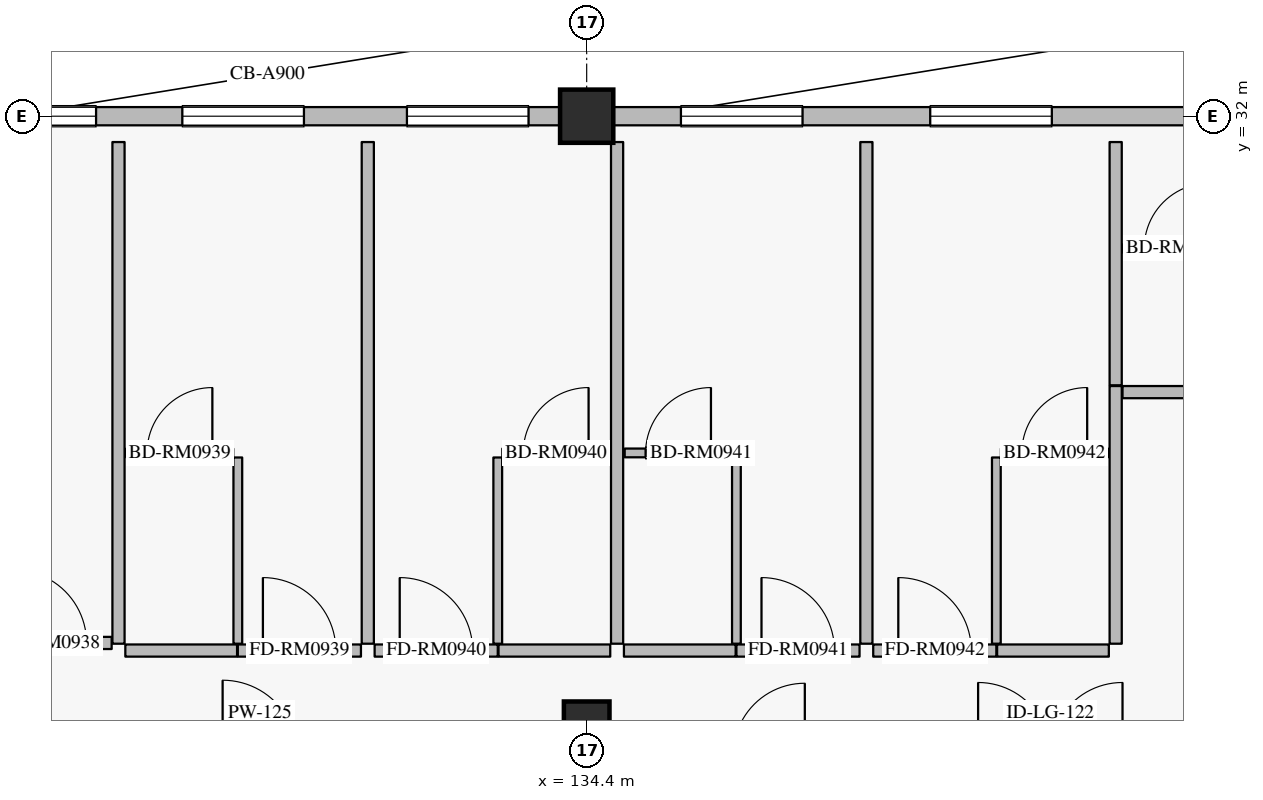
"""IFC4 building model, lengths in metres.
Left out: names, types, materials, properties, quantities, classifications, styles, units other than length and angle.
Written with IfcOpenShell. Run it as: python <this file> out.ifc"""

import sys

from ifc_helpers import new_model, si_unit, direction, frame, frame_2d, origin, origin_2d, place, context, subcontext, project, spatial, rectangle, extrude, element, fill, save


model = new_model("IFC4")
c1 = context("Model", 3, precision=1e-05, world=origin(), true_north=direction((0.0, 1.0)))
c2 = subcontext(c1, "Body", "Model", "MODEL_VIEW")
j1 = project(units=[si_unit("LENGTHUNIT", "METRE"), si_unit("PLANEANGLEUNIT", "RADIAN")], contexts=[c1])
p1 = place(None, origin())
s1 = spatial("IfcSite", under=j1, at=p1, CompositionType="ELEMENT")
p2 = place(p1, origin())
s2 = spatial("IfcBuilding", under=s1, at=p2, CompositionType="ELEMENT")
p3 = place(p2, frame((0.0, 0.0, 36.0)))
s3 = spatial("IfcBuildingStorey", under=s2, at=p3, CompositionType="ELEMENT", Elevation=36.0)
p4 = place(p3, frame((134.4, 32.0, 0.0), z_axis=(0.0, 0.0, 1.0), x_axis=(1.0, 0.0, 0.0)))
e1 = element("IfcColumn", 1, at=p4, inside=s3, PredefinedType="COLUMN", context=c2, shape_type="SweptSolid", body=[
    extrude(rectangle(XDim=0.7, YDim=0.7, at=origin_2d()), origin(), (0.0, 0.0, 1.0), 3.6),
])
p5 = place(p3, frame((134.4, 24.0, 0.0), z_axis=(0.0, 0.0, 1.0), x_axis=(1.0, 0.0, 0.0)))
e2 = element("IfcColumn", 2, at=p5, inside=s3, PredefinedType="COLUMN", context=c2, shape_type="SweptSolid", body=[
    extrude(rectangle(XDim=0.6, YDim=0.6, at=origin_2d()), origin(), (0.0, 0.0, 1.0), 3.6),
])
p6 = place(p3, frame((126.35, 32.0, 0.0), z_axis=(0.0, 0.0, 1.0), x_axis=(1.0, 0.0, 0.0)))
e3 = element("IfcWall", 3, at=p6, inside=s3, PredefinedType="SOLIDWALL", context=c2, shape_type="SweptSolid", body=[
    extrude(rectangle(XDim=7.7, YDim=0.24, at=frame_2d((3.85, 0.0))), origin(), (0.0, 0.0, 1.0), 2.94),
])
p7 = place(p6, frame((0.195, 0.0, 0.8)))
e4 = element("IfcOpeningElement", 4, at=p7, cuts=e3, PredefinedType="OPENING", context=c2, shape_type="SweptSolid", body=[
    extrude(rectangle(XDim=1.4, YDim=1.6, at=frame_2d((0.7, 0.8))), frame((0.0, 0.13, 0.0), z_axis=(0.0, -1.0, 0.0), x_axis=(1.0, 0.0, 0.0)), (0.0, 0.0, 1.0), 0.26),
])
p8 = place(p6, frame((2.73, 0.0, 0.8)))
e5 = element("IfcOpeningElement", 5, at=p8, cuts=e3, PredefinedType="OPENING", context=c2, shape_type="SweptSolid", body=[
    extrude(rectangle(XDim=1.6, YDim=1.6, at=frame_2d((0.8, 0.8))), frame((0.0, 0.13, 0.0), z_axis=(0.0, -1.0, 0.0), x_axis=(1.0, 0.0, 0.0)), (0.0, 0.0, 1.0), 0.26),
])
p9 = place(p6, frame((5.685, 0.0, 0.8)))
e6 = element("IfcOpeningElement", 6, at=p9, cuts=e3, PredefinedType="OPENING", context=c2, shape_type="SweptSolid", body=[
    extrude(rectangle(XDim=1.6, YDim=1.6, at=frame_2d((0.8, 0.8))), frame((0.0, 0.13, 0.0), z_axis=(0.0, -1.0, 0.0), x_axis=(1.0, 0.0, 0.0)), (0.0, 0.0, 1.0), 0.26),
])
p10 = place(p3, frame((134.75, 32.0, 0.0), z_axis=(0.0, 0.0, 1.0), x_axis=(1.0, 0.0, 0.0)))
e7 = element("IfcWall", 7, at=p10, inside=s3, PredefinedType="SOLIDWALL", context=c2, shape_type="SweptSolid", body=[
    extrude(rectangle(XDim=7.7, YDim=0.24, at=frame_2d((3.85, 0.0))), origin(), (0.0, 0.0, 1.0), 2.94),
])
p11 = place(p10, frame((0.89, 0.0, 0.8)))
e8 = element("IfcOpeningElement", 8, at=p11, cuts=e7, PredefinedType="OPENING", context=c2, shape_type="SweptSolid", body=[
    extrude(rectangle(XDim=1.6, YDim=1.6, at=frame_2d((0.8, 0.8))), frame((0.0, 0.13, 0.0), z_axis=(0.0, -1.0, 0.0), x_axis=(1.0, 0.0, 0.0)), (0.0, 0.0, 1.0), 0.26),
])
p12 = place(p10, frame((4.17, 0.0, 0.8)))
e9 = element("IfcOpeningElement", 9, at=p12, cuts=e7, PredefinedType="OPENING", context=c2, shape_type="SweptSolid", body=[
    extrude(rectangle(XDim=1.6, YDim=1.6, at=frame_2d((0.8, 0.8))), frame((0.0, 0.13, 0.0), z_axis=(0.0, -1.0, 0.0), x_axis=(1.0, 0.0, 0.0)), (0.0, 0.0, 1.0), 0.26),
])
p13 = place(p3, frame((126.53, 25.07, 0.0), z_axis=(0.0, 0.0, 1.0), x_axis=(1.0, 0.0, 0.0)))
e10 = element("IfcWall", 10, at=p13, inside=s3, PredefinedType="PARTITIONING", context=c2, shape_type="SweptSolid", body=[
    extrude(rectangle(XDim=1.62, YDim=0.16, at=frame_2d((0.81, 0.0))), origin(), (0.0, 0.0, 1.0), 3.365),
])
p14 = place(p13, frame((0.33, 0.0, 0.0)))
e11 = element("IfcOpeningElement", 11, at=p14, cuts=e10, PredefinedType="OPENING", context=c2, shape_type="SweptSolid", body=[
    extrude(rectangle(XDim=0.96, YDim=2.2, at=frame_2d((0.48, 1.1))), frame((0.0, 0.09, 0.0), z_axis=(0.0, -1.0, 0.0), x_axis=(1.0, 0.0, 0.0)), (0.0, 0.0, 1.0), 0.18),
])
p15 = place(p3, frame((128.33, 24.97, 0.0), z_axis=(0.0, 0.0, 1.0), x_axis=(1.0, 0.0, 0.0)))
e12 = element("IfcWall", 12, at=p15, inside=s3, PredefinedType="PARTITIONING", context=c2, shape_type="SweptSolid", body=[
    extrude(rectangle(XDim=1.47, YDim=0.16, at=frame_2d((0.735, 0.0))), origin(), (0.0, 0.0, 1.0), 3.365),
])
p16 = place(p3, frame((129.81, 24.97, 0.0), z_axis=(0.0, 0.0, 1.0), x_axis=(1.0, 0.0, 0.0)))
e13 = element("IfcWall", 13, at=p16, inside=s3, PredefinedType="PARTITIONING", context=c2, shape_type="SweptSolid", body=[
    extrude(rectangle(XDim=1.62, YDim=0.16, at=frame_2d((0.81, 0.0))), origin(), (0.0, 0.0, 1.0), 3.365),
])
p17 = place(p16, frame((0.33, 0.0, 0.0)))
e14 = element("IfcOpeningElement", 14, at=p17, cuts=e13, PredefinedType="OPENING", context=c2, shape_type="SweptSolid", body=[
    extrude(rectangle(XDim=0.96, YDim=2.2, at=frame_2d((0.48, 1.1))), frame((0.0, 0.09, 0.0), z_axis=(0.0, -1.0, 0.0), x_axis=(1.0, 0.0, 0.0)), (0.0, 0.0, 1.0), 0.18),
])
p18 = place(p3, frame((129.81, 25.06, 0.0), z_axis=(0.0, 0.0, 1.0), x_axis=(0.0, 1.0, 0.0)))
e15 = element("IfcWall", 15, at=p18, inside=s3, PredefinedType="PARTITIONING", context=c2, shape_type="SweptSolid", body=[
    extrude(rectangle(XDim=2.45, YDim=0.115, at=frame_2d((1.225, 0.0))), origin(), (0.0, 0.0, 1.0), 3.365),
])
p19 = place(p3, frame((128.34, 27.57, 0.0), z_axis=(0.0, 0.0, 1.0), x_axis=(1.0, 0.0, 0.0)))
e16 = element("IfcWall", 16, at=p19, inside=s3, PredefinedType="PARTITIONING", context=c2, shape_type="SweptSolid", body=[
    extrude(rectangle(XDim=1.41, YDim=0.115, at=frame_2d((0.705, 0.0))), origin(), (0.0, 0.0, 1.0), 3.365),
])
p20 = place(p19, frame((0.275, 0.0, 0.0)))
e17 = element("IfcOpeningElement", 17, at=p20, cuts=e16, PredefinedType="OPENING", context=c2, shape_type="SweptSolid", body=[
    extrude(rectangle(XDim=0.86, YDim=2.12, at=frame_2d((0.43, 1.06))), frame((0.0, 0.067, 0.0), z_axis=(0.0, -1.0, 0.0), x_axis=(1.0, 0.0, 0.0)), (0.0, 0.0, 1.0), 0.135),
])
p21 = place(p3, frame((128.24, 25.06, 0.0), z_axis=(0.0, 0.0, 1.0), x_axis=(0.0, 1.0, 0.0)))
e18 = element("IfcWall", 18, at=p21, inside=s3, PredefinedType="PARTITIONING", context=c2, shape_type="SweptSolid", body=[
    extrude(rectangle(XDim=6.6, YDim=0.16, at=frame_2d((3.3, 0.0))), origin(), (0.0, 0.0, 1.0), 3.365),
])
p22 = place(p3, frame((131.61, 24.97, 0.0), z_axis=(0.0, 0.0, 1.0), x_axis=(1.0, 0.0, 0.0)))
e19 = element("IfcWall", 19, at=p22, inside=s3, PredefinedType="PARTITIONING", context=c2, shape_type="SweptSolid", body=[
    extrude(rectangle(XDim=1.62, YDim=0.16, at=frame_2d((0.81, 0.0))), origin(), (0.0, 0.0, 1.0), 3.365),
])
p23 = place(p22, frame((0.33, 0.0, 0.0)))
e20 = element("IfcOpeningElement", 20, at=p23, cuts=e19, PredefinedType="OPENING", context=c2, shape_type="SweptSolid", body=[
    extrude(rectangle(XDim=0.96, YDim=2.2, at=frame_2d((0.48, 1.1))), frame((0.0, 0.09, 0.0), z_axis=(0.0, -1.0, 0.0), x_axis=(1.0, 0.0, 0.0)), (0.0, 0.0, 1.0), 0.18),
])
p24 = place(p3, frame((133.24, 24.97, 0.0), z_axis=(0.0, 0.0, 1.0), x_axis=(1.0, 0.0, 0.0)))
e21 = element("IfcWall", 21, at=p24, inside=s3, PredefinedType="PARTITIONING", context=c2, shape_type="SweptSolid", body=[
    extrude(rectangle(XDim=1.47, YDim=0.16, at=frame_2d((0.735, 0.0))), origin(), (0.0, 0.0, 1.0), 3.365),
])
p25 = place(p3, frame((133.23, 25.06, 0.0), z_axis=(0.0, 0.0, 1.0), x_axis=(0.0, 1.0, 0.0)))
e22 = element("IfcWall", 22, at=p25, inside=s3, PredefinedType="PARTITIONING", context=c2, shape_type="SweptSolid", body=[
    extrude(rectangle(XDim=2.45, YDim=0.115, at=frame_2d((1.225, 0.0))), origin(), (0.0, 0.0, 1.0), 3.365),
])
p26 = place(p3, frame((133.29, 27.57, 0.0), z_axis=(0.0, 0.0, 1.0), x_axis=(1.0, 0.0, 0.0)))
e23 = element("IfcWall", 23, at=p26, inside=s3, PredefinedType="PARTITIONING", context=c2, shape_type="SweptSolid", body=[
    extrude(rectangle(XDim=1.41, YDim=0.115, at=frame_2d((0.705, 0.0))), origin(), (0.0, 0.0, 1.0), 3.365),
])
p27 = place(p26, frame((0.275, 0.0, 0.0)))
e24 = element("IfcOpeningElement", 24, at=p27, cuts=e23, PredefinedType="OPENING", context=c2, shape_type="SweptSolid", body=[
    extrude(rectangle(XDim=0.86, YDim=2.12, at=frame_2d((0.43, 1.06))), frame((0.0, 0.067, 0.0), z_axis=(0.0, -1.0, 0.0), x_axis=(1.0, 0.0, 0.0)), (0.0, 0.0, 1.0), 0.135),
])
p28 = place(p3, frame((131.52, 25.06, 0.0), z_axis=(0.0, 0.0, 1.0), x_axis=(0.0, 1.0, 0.0)))
e25 = element("IfcWall", 25, at=p28, inside=s3, PredefinedType="PARTITIONING", context=c2, shape_type="SweptSolid", body=[
    extrude(rectangle(XDim=6.6, YDim=0.16, at=frame_2d((3.3, 0.0))), origin(), (0.0, 0.0, 1.0), 3.365),
])
p29 = place(p3, frame((134.89, 24.97, 0.0), z_axis=(0.0, 0.0, 1.0), x_axis=(1.0, 0.0, 0.0)))
e26 = element("IfcWall", 26, at=p29, inside=s3, PredefinedType="PARTITIONING", context=c2, shape_type="SweptSolid", body=[
    extrude(rectangle(XDim=1.47, YDim=0.16, at=frame_2d((0.735, 0.0))), origin(), (0.0, 0.0, 1.0), 3.365),
])
p30 = place(p3, frame((136.37, 24.97, 0.0), z_axis=(0.0, 0.0, 1.0), x_axis=(1.0, 0.0, 0.0)))
e27 = element("IfcWall", 27, at=p30, inside=s3, PredefinedType="PARTITIONING", context=c2, shape_type="SweptSolid", body=[
    extrude(rectangle(XDim=1.62, YDim=0.16, at=frame_2d((0.81, 0.0))), origin(), (0.0, 0.0, 1.0), 3.365),
])
p31 = place(p30, frame((0.33, 0.0, 0.0)))
e28 = element("IfcOpeningElement", 28, at=p31, cuts=e27, PredefinedType="OPENING", context=c2, shape_type="SweptSolid", body=[
    extrude(rectangle(XDim=0.96, YDim=2.2, at=frame_2d((0.48, 1.1))), frame((0.0, 0.09, 0.0), z_axis=(0.0, -1.0, 0.0), x_axis=(1.0, 0.0, 0.0)), (0.0, 0.0, 1.0), 0.18),
])
p32 = place(p3, frame((136.37, 25.06, 0.0), z_axis=(0.0, 0.0, 1.0), x_axis=(0.0, 1.0, 0.0)))
e29 = element("IfcWall", 29, at=p32, inside=s3, PredefinedType="PARTITIONING", context=c2, shape_type="SweptSolid", body=[
    extrude(rectangle(XDim=2.45, YDim=0.115, at=frame_2d((1.225, 0.0))), origin(), (0.0, 0.0, 1.0), 3.365),
])
p33 = place(p3, frame((134.9, 27.57, 0.0), z_axis=(0.0, 0.0, 1.0), x_axis=(1.0, 0.0, 0.0)))
e30 = element("IfcWall", 30, at=p33, inside=s3, PredefinedType="PARTITIONING", context=c2, shape_type="SweptSolid", body=[
    extrude(rectangle(XDim=1.41, YDim=0.115, at=frame_2d((0.705, 0.0))), origin(), (0.0, 0.0, 1.0), 3.365),
])
p34 = place(p33, frame((0.275, 0.0, 0.0)))
e31 = element("IfcOpeningElement", 31, at=p34, cuts=e30, PredefinedType="OPENING", context=c2, shape_type="SweptSolid", body=[
    extrude(rectangle(XDim=0.86, YDim=2.12, at=frame_2d((0.43, 1.06))), frame((0.0, 0.067, 0.0), z_axis=(0.0, -1.0, 0.0), x_axis=(1.0, 0.0, 0.0)), (0.0, 0.0, 1.0), 0.135),
])
p35 = place(p3, frame((134.8, 25.06, 0.0), z_axis=(0.0, 0.0, 1.0), x_axis=(0.0, 1.0, 0.0)))
e32 = element("IfcWall", 32, at=p35, inside=s3, PredefinedType="PARTITIONING", context=c2, shape_type="SweptSolid", body=[
    extrude(rectangle(XDim=6.6, YDim=0.16, at=frame_2d((3.3, 0.0))), origin(), (0.0, 0.0, 1.0), 3.365),
])
p36 = place(p3, frame((138.17, 24.97, 0.0), z_axis=(0.0, 0.0, 1.0), x_axis=(1.0, 0.0, 0.0)))
e33 = element("IfcWall", 33, at=p36, inside=s3, PredefinedType="PARTITIONING", context=c2, shape_type="SweptSolid", body=[
    extrude(rectangle(XDim=1.62, YDim=0.16, at=frame_2d((0.81, 0.0))), origin(), (0.0, 0.0, 1.0), 3.365),
])
p37 = place(p36, frame((0.33, 0.0, 0.0)))
e34 = element("IfcOpeningElement", 34, at=p37, cuts=e33, PredefinedType="OPENING", context=c2, shape_type="SweptSolid", body=[
    extrude(rectangle(XDim=0.96, YDim=2.2, at=frame_2d((0.48, 1.1))), frame((0.0, 0.09, 0.0), z_axis=(0.0, -1.0, 0.0), x_axis=(1.0, 0.0, 0.0)), (0.0, 0.0, 1.0), 0.18),
])
p38 = place(p3, frame((139.8, 24.97, 0.0), z_axis=(0.0, 0.0, 1.0), x_axis=(1.0, 0.0, 0.0)))
e35 = element("IfcWall", 35, at=p38, inside=s3, PredefinedType="PARTITIONING", context=c2, shape_type="SweptSolid", body=[
    extrude(rectangle(XDim=1.47, YDim=0.16, at=frame_2d((0.735, 0.0))), origin(), (0.0, 0.0, 1.0), 3.365),
])
p39 = place(p3, frame((139.79, 25.06, 0.0), z_axis=(0.0, 0.0, 1.0), x_axis=(0.0, 1.0, 0.0)))
e36 = element("IfcWall", 36, at=p39, inside=s3, PredefinedType="PARTITIONING", context=c2, shape_type="SweptSolid", body=[
    extrude(rectangle(XDim=2.45, YDim=0.115, at=frame_2d((1.225, 0.0))), origin(), (0.0, 0.0, 1.0), 3.365),
])
p40 = place(p3, frame((139.85, 27.57, 0.0), z_axis=(0.0, 0.0, 1.0), x_axis=(1.0, 0.0, 0.0)))
e37 = element("IfcWall", 37, at=p40, inside=s3, PredefinedType="PARTITIONING", context=c2, shape_type="SweptSolid", body=[
    extrude(rectangle(XDim=1.41, YDim=0.115, at=frame_2d((0.705, 0.0))), origin(), (0.0, 0.0, 1.0), 3.365),
])
p41 = place(p40, frame((0.275, 0.0, 0.0)))
e38 = element("IfcOpeningElement", 38, at=p41, cuts=e37, PredefinedType="OPENING", context=c2, shape_type="SweptSolid", body=[
    extrude(rectangle(XDim=0.86, YDim=2.12, at=frame_2d((0.43, 1.06))), frame((0.0, 0.067, 0.0), z_axis=(0.0, -1.0, 0.0), x_axis=(1.0, 0.0, 0.0)), (0.0, 0.0, 1.0), 0.135),
])
p42 = place(p3, frame((138.08, 25.06, 0.0), z_axis=(0.0, 0.0, 1.0), x_axis=(0.0, 1.0, 0.0)))
e39 = element("IfcWall", 39, at=p42, inside=s3, PredefinedType="PARTITIONING", context=c2, shape_type="SweptSolid", body=[
    extrude(rectangle(XDim=6.6, YDim=0.16, at=frame_2d((3.3, 0.0))), origin(), (0.0, 0.0, 1.0), 3.365),
])
p43 = place(p3, frame((141.36, 25.06, 0.0), z_axis=(0.0, 0.0, 1.0), x_axis=(0.0, 1.0, 0.0)))
e40 = element("IfcWall", 40, at=p43, inside=s3, PredefinedType="PARTITIONING", context=c2, shape_type="SweptSolid", body=[
    extrude(rectangle(XDim=3.39, YDim=0.16, at=frame_2d((1.695, 0.0))), origin(), (0.0, 0.0, 1.0), 3.365),
])
p44 = place(p3, frame((141.45, 28.37, 0.0), z_axis=(0.0, 0.0, 1.0), x_axis=(1.0, 0.0, 0.0)))
e41 = element("IfcWall", 41, at=p44, inside=s3, PredefinedType="PARTITIONING", context=c2, shape_type="SweptSolid", body=[
    extrude(rectangle(XDim=1.47, YDim=0.16, at=frame_2d((0.735, 0.0))), origin(), (0.0, 0.0, 1.0), 3.365),
])
p45 = place(p3, frame((141.46, 30.26, 0.0), z_axis=(0.0, 0.0, 1.0), x_axis=(1.0, 0.0, 0.0)))
e42 = element("IfcWall", 42, at=p45, inside=s3, PredefinedType="PARTITIONING", context=c2, shape_type="SweptSolid", body=[
    extrude(rectangle(XDim=1.41, YDim=0.115, at=frame_2d((0.705, 0.0))), origin(), (0.0, 0.0, 1.0), 3.365),
])
p46 = place(p45, frame((0.275, 0.0, 0.0)))
e43 = element("IfcOpeningElement", 43, at=p46, cuts=e42, PredefinedType="OPENING", context=c2, shape_type="SweptSolid", body=[
    extrude(rectangle(XDim=0.86, YDim=2.12, at=frame_2d((0.43, 1.06))), frame((0.0, 0.067, 0.0), z_axis=(0.0, -1.0, 0.0), x_axis=(1.0, 0.0, 0.0)), (0.0, 0.0, 1.0), 0.135),
])
p47 = place(p3, frame((141.36, 28.46, 0.0), z_axis=(0.0, 0.0, 1.0), x_axis=(0.0, 1.0, 0.0)))
e44 = element("IfcWall", 44, at=p47, inside=s3, PredefinedType="PARTITIONING", context=c2, shape_type="SweptSolid", body=[
    extrude(rectangle(XDim=3.2, YDim=0.16, at=frame_2d((1.6, 0.0))), origin(), (0.0, 0.0, 1.0), 3.365),
])
p48 = place(p7, origin())
e45 = element("IfcWindow", 45, at=p48, inside=s3, PartitioningType="SINGLE_PANEL", PredefinedType="WINDOW", context=c2, shape_type="SweptSolid", body=[
    extrude(rectangle(XDim=1.4, YDim=1.6, at=frame_2d((0.7, 0.8))), frame((0.0, 0.03, 0.0), z_axis=(0.0, -1.0, 0.0), x_axis=(1.0, 0.0, 0.0)), (0.0, 0.0, 1.0), 0.06),
])
fill(e4, e45)
p49 = place(p8, origin())
e46 = element("IfcWindow", 46, at=p49, inside=s3, PartitioningType="SINGLE_PANEL", PredefinedType="WINDOW", context=c2, shape_type="SweptSolid", body=[
    extrude(rectangle(XDim=1.6, YDim=1.6, at=frame_2d((0.8, 0.8))), frame((0.0, 0.03, 0.0), z_axis=(0.0, -1.0, 0.0), x_axis=(1.0, 0.0, 0.0)), (0.0, 0.0, 1.0), 0.06),
])
fill(e5, e46)
p50 = place(p9, origin())
e47 = element("IfcWindow", 47, at=p50, inside=s3, PartitioningType="SINGLE_PANEL", PredefinedType="WINDOW", context=c2, shape_type="SweptSolid", body=[
    extrude(rectangle(XDim=1.6, YDim=1.6, at=frame_2d((0.8, 0.8))), frame((0.0, 0.03, 0.0), z_axis=(0.0, -1.0, 0.0), x_axis=(1.0, 0.0, 0.0)), (0.0, 0.0, 1.0), 0.06),
])
fill(e6, e47)
p51 = place(p11, origin())
e48 = element("IfcWindow", 48, at=p51, inside=s3, PartitioningType="SINGLE_PANEL", PredefinedType="WINDOW", context=c2, shape_type="SweptSolid", body=[
    extrude(rectangle(XDim=1.6, YDim=1.6, at=frame_2d((0.8, 0.8))), frame((0.0, 0.03, 0.0), z_axis=(0.0, -1.0, 0.0), x_axis=(1.0, 0.0, 0.0)), (0.0, 0.0, 1.0), 0.06),
])
fill(e8, e48)
p52 = place(p12, origin())
e49 = element("IfcWindow", 49, at=p52, inside=s3, PartitioningType="SINGLE_PANEL", PredefinedType="WINDOW", context=c2, shape_type="SweptSolid", body=[
    extrude(rectangle(XDim=1.6, YDim=1.6, at=frame_2d((0.8, 0.8))), frame((0.0, 0.03, 0.0), z_axis=(0.0, -1.0, 0.0), x_axis=(1.0, 0.0, 0.0)), (0.0, 0.0, 1.0), 0.06),
])
fill(e9, e49)
p53 = place(p14, origin())
e50 = element("IfcDoor", 50, at=p53, inside=s3, OperationType="SINGLE_SWING_LEFT", PredefinedType="DOOR", context=c2, shape_type="SweptSolid", body=[
    extrude(rectangle(XDim=0.96, YDim=2.2, at=frame_2d((0.48, 1.1))), frame((0.0, 0.025, 0.0), z_axis=(0.0, -1.0, 0.0), x_axis=(1.0, 0.0, 0.0)), (0.0, 0.0, 1.0), 0.05),
])
fill(e11, e50)
p54 = place(p17, origin())
e51 = element("IfcDoor", 51, at=p54, inside=s3, OperationType="SINGLE_SWING_LEFT", PredefinedType="DOOR", context=c2, shape_type="SweptSolid", body=[
    extrude(rectangle(XDim=0.96, YDim=2.2, at=frame_2d((0.48, 1.1))), frame((0.0, 0.025, 0.0), z_axis=(0.0, -1.0, 0.0), x_axis=(1.0, 0.0, 0.0)), (0.0, 0.0, 1.0), 0.05),
])
fill(e14, e51)
p55 = place(p20, origin())
e52 = element("IfcDoor", 52, at=p55, inside=s3, OperationType="SINGLE_SWING_RIGHT", PredefinedType="DOOR", context=c2, shape_type="SweptSolid", body=[
    extrude(rectangle(XDim=0.86, YDim=2.12, at=frame_2d((0.43, 1.06))), frame((0.0, 0.025, 0.0), z_axis=(0.0, -1.0, 0.0), x_axis=(1.0, 0.0, 0.0)), (0.0, 0.0, 1.0), 0.05),
])
fill(e17, e52)
p56 = place(p23, origin())
e53 = element("IfcDoor", 53, at=p56, inside=s3, OperationType="SINGLE_SWING_LEFT", PredefinedType="DOOR", context=c2, shape_type="SweptSolid", body=[
    extrude(rectangle(XDim=0.96, YDim=2.2, at=frame_2d((0.48, 1.1))), frame((0.0, 0.025, 0.0), z_axis=(0.0, -1.0, 0.0), x_axis=(1.0, 0.0, 0.0)), (0.0, 0.0, 1.0), 0.05),
])
fill(e20, e53)
p57 = place(p27, origin())
e54 = element("IfcDoor", 54, at=p57, inside=s3, OperationType="SINGLE_SWING_RIGHT", PredefinedType="DOOR", context=c2, shape_type="SweptSolid", body=[
    extrude(rectangle(XDim=0.86, YDim=2.12, at=frame_2d((0.43, 1.06))), frame((0.0, 0.025, 0.0), z_axis=(0.0, -1.0, 0.0), x_axis=(1.0, 0.0, 0.0)), (0.0, 0.0, 1.0), 0.05),
])
fill(e24, e54)
p58 = place(p31, origin())
e55 = element("IfcDoor", 55, at=p58, inside=s3, OperationType="SINGLE_SWING_LEFT", PredefinedType="DOOR", context=c2, shape_type="SweptSolid", body=[
    extrude(rectangle(XDim=0.96, YDim=2.2, at=frame_2d((0.48, 1.1))), frame((0.0, 0.025, 0.0), z_axis=(0.0, -1.0, 0.0), x_axis=(1.0, 0.0, 0.0)), (0.0, 0.0, 1.0), 0.05),
])
fill(e28, e55)
p59 = place(p34, origin())
e56 = element("IfcDoor", 56, at=p59, inside=s3, OperationType="SINGLE_SWING_RIGHT", PredefinedType="DOOR", context=c2, shape_type="SweptSolid", body=[
    extrude(rectangle(XDim=0.86, YDim=2.12, at=frame_2d((0.43, 1.06))), frame((0.0, 0.025, 0.0), z_axis=(0.0, -1.0, 0.0), x_axis=(1.0, 0.0, 0.0)), (0.0, 0.0, 1.0), 0.05),
])
fill(e31, e56)
p60 = place(p37, origin())
e57 = element("IfcDoor", 57, at=p60, inside=s3, OperationType="SINGLE_SWING_LEFT", PredefinedType="DOOR", context=c2, shape_type="SweptSolid", body=[
    extrude(rectangle(XDim=0.96, YDim=2.2, at=frame_2d((0.48, 1.1))), frame((0.0, 0.025, 0.0), z_axis=(0.0, -1.0, 0.0), x_axis=(1.0, 0.0, 0.0)), (0.0, 0.0, 1.0), 0.05),
])
fill(e34, e57)
p61 = place(p41, origin())
e58 = element("IfcDoor", 58, at=p61, inside=s3, OperationType="SINGLE_SWING_RIGHT", PredefinedType="DOOR", context=c2, shape_type="SweptSolid", body=[
    extrude(rectangle(XDim=0.86, YDim=2.12, at=frame_2d((0.43, 1.06))), frame((0.0, 0.025, 0.0), z_axis=(0.0, -1.0, 0.0), x_axis=(1.0, 0.0, 0.0)), (0.0, 0.0, 1.0), 0.05),
])
fill(e38, e58)
p62 = place(p46, origin())
e59 = element("IfcDoor", 59, at=p62, inside=s3, OperationType="SINGLE_SWING_RIGHT", PredefinedType="DOOR", context=c2, shape_type="SweptSolid", body=[
    extrude(rectangle(XDim=0.86, YDim=2.12, at=frame_2d((0.43, 1.06))), frame((0.0, 0.025, 0.0), z_axis=(0.0, -1.0, 0.0), x_axis=(1.0, 0.0, 0.0)), (0.0, 0.0, 1.0), 0.05),
])
fill(e43, e59)
save(model, sys.argv[1])
